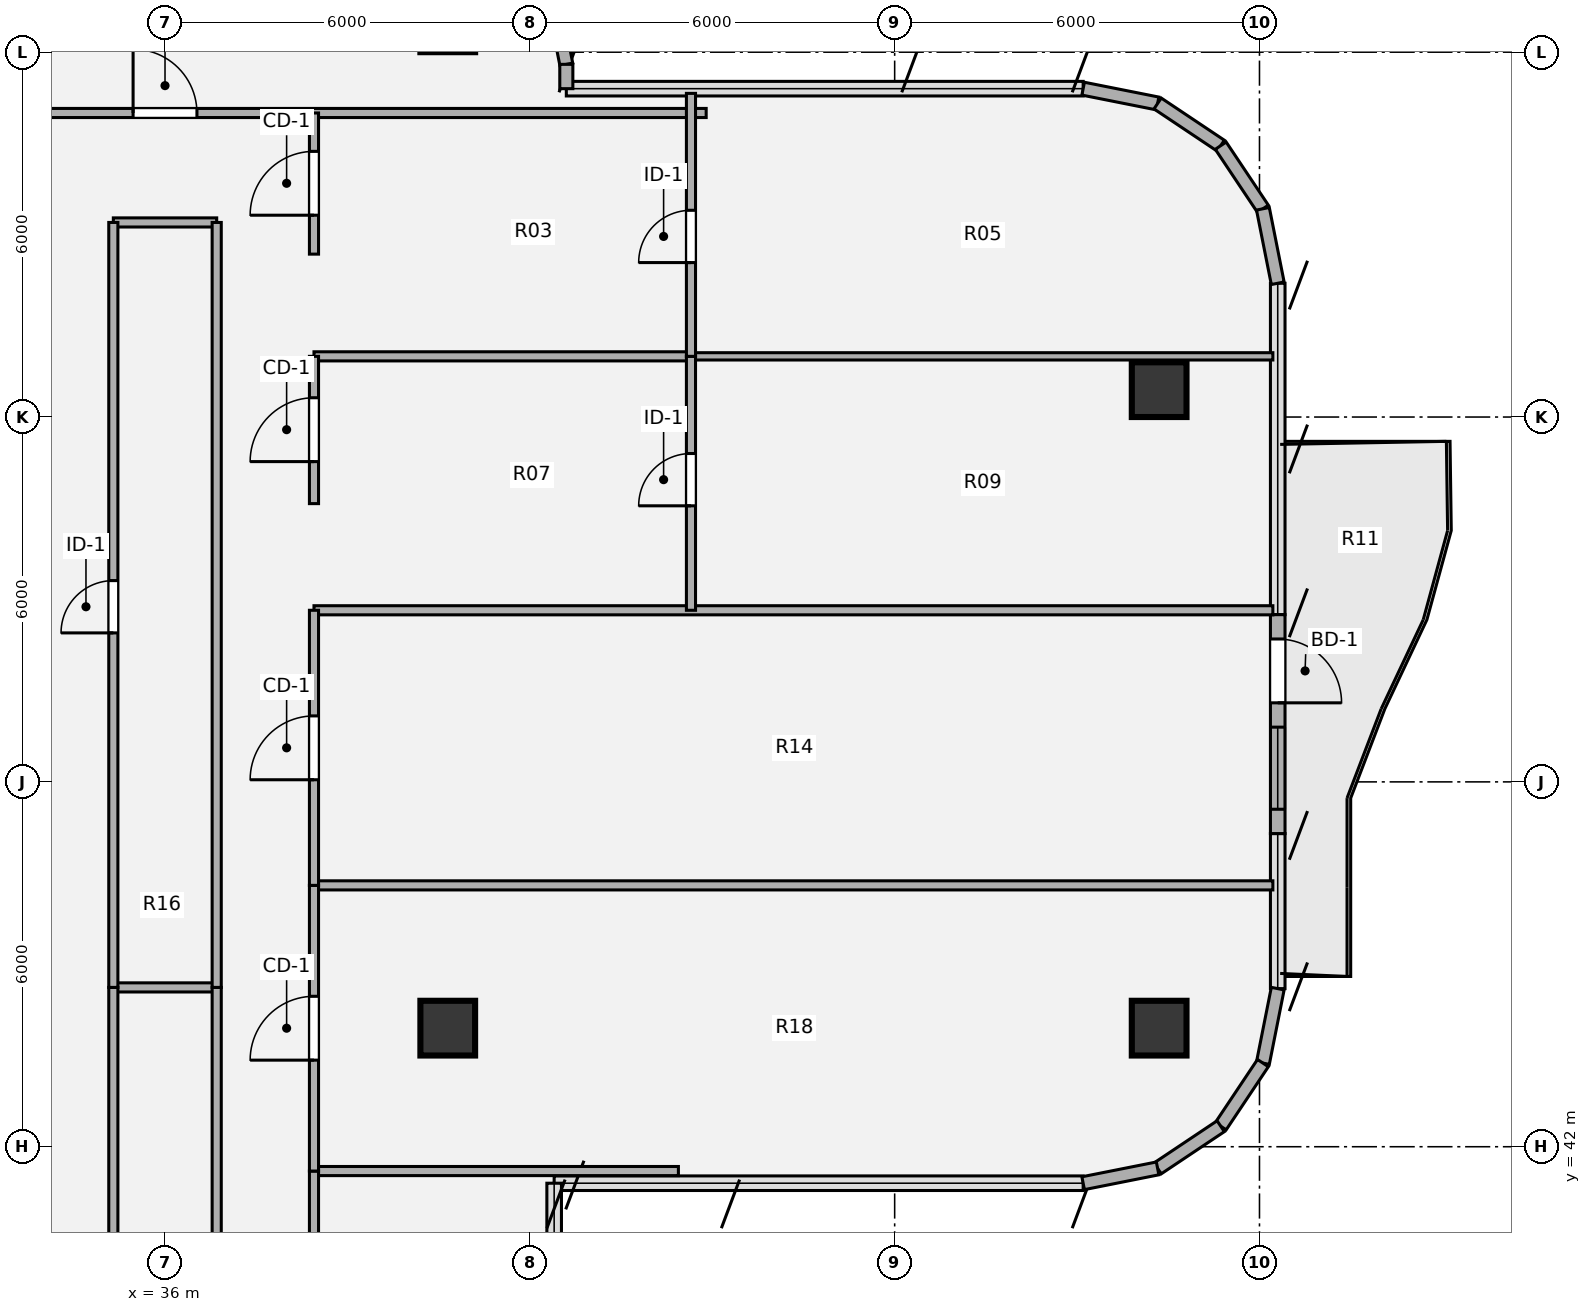
"""IFC4 building model, lengths in metres.
Left out: names, types, materials, properties, quantities, classifications, styles, units other than length and angle.
Written with IfcOpenShell. Run it as: python <this file> out.ifc"""

import sys

from ifc_helpers import new_model, si_unit, direction, frame, frame_2d, origin, origin_2d, place, context, subcontext, project, spatial, rectangle, hollow_circle, extrude, source, transform, mapped, element, fill, save


model = new_model("IFC4")
c1 = context("Model", 3, precision=1e-05, world=origin(), true_north=direction((0.0, 1.0)))
c2 = subcontext(c1, "Body", "Model", "MODEL_VIEW")
j1 = project(units=[si_unit("LENGTHUNIT", "METRE"), si_unit("PLANEANGLEUNIT", "RADIAN")], contexts=[c1])
p1 = place(None, origin())
s1 = spatial("IfcSite", under=j1, at=p1, CompositionType="ELEMENT")
p2 = place(p1, origin())
s2 = spatial("IfcBuilding", under=s1, at=p2, CompositionType="ELEMENT")
p3 = place(p2, frame((0.0, 0.0, 264.6)))
s3 = spatial("IfcBuildingStorey", under=s2, at=p3, CompositionType="ELEMENT", Elevation=264.6)
m1 = source(origin(), c2, "Body", "SweptSolid", [
    extrude(hollow_circle(Radius=0.45, WallThickness=0.032, at=origin_2d()), origin(), (0.0, 0.0, 1.0), 3.78),
])
for number, where, z_axis, x_axis in (
    (1, (52.35, 43.95, 0.0), (0.0, 0.0, 1.0), (1.0, 0.0, 0.0)),
    (2, (52.35, 54.45, 0.0), (0.0, 0.0, 1.0), (1.0, 0.0, 0.0)),
    (3, (40.65, 43.95, 0.0), (0.0, 0.0, 1.0), (1.0, 0.0, 0.0)),
):
    element("IfcColumn", number, at=place(p3, frame(where, z_axis=z_axis, x_axis=x_axis)), inside=s3, PredefinedType="COLUMN", context=c2, shape_type="MappedRepresentation", body=[
        mapped(m1, transform((0.0, 0.0, 0.0), x_axis=(1.0, 0.0, 0.0), y_axis=(0.0, 1.0, 0.0), z_axis=(0.0, 0.0, 1.0), scale=1.0)),
    ])
p4 = place(p3, frame((42.402, 60.795, 0.0), z_axis=(0.0, 0.0, 1.0), x_axis=(0.195190360752, -0.980765376158, 0.0)))
e4 = element("IfcWall", 4, at=p4, inside=s3, PredefinedType="SOLIDWALL", context=c2, shape_type="SweptSolid", body=[
    extrude(rectangle(XDim=1.014, YDim=0.215, at=frame_2d((0.507, 0.0))), origin(), (0.0, 0.0, 1.0), 3.53),
])
p5 = place(p3, frame((42.6, 59.8, 0.0), z_axis=(0.0, 0.0, 1.0), x_axis=(0.0, -1.0, 0.0)))
e5 = element("IfcWall", 5, at=p5, inside=s3, PredefinedType="SOLIDWALL", context=c2, shape_type="SweptSolid", body=[
    extrude(rectangle(XDim=0.4, YDim=0.215, at=frame_2d((0.2, 0.0))), origin(), (0.0, 0.0, 1.0), 3.53),
])
for number, where, z_axis, x_axis in (
    (6, (51.1, 59.4, 0.0), (0.0, 0.0, 1.0), (0.981, -0.195, 0.0)),
    (7, (52.325, 59.156, 0.0), (0.0, 0.0, 1.0), (0.831, -0.556, 0.0)),
    (8, (53.363, 58.463, 0.0), (0.0, 0.0, 1.0), (0.556, -0.831, 0.0)),
    (9, (54.056, 57.425, 0.0), (0.0, 0.0, 1.0), (0.195, -0.981, 0.0)),
):
    element("IfcWall", number, at=place(p3, frame(where, z_axis=z_axis, x_axis=x_axis)), inside=s3, PredefinedType="SOLIDWALL", context=c2, shape_type="SweptSolid", body=[
        extrude(rectangle(XDim=1.249, YDim=0.215, at=frame_2d((0.624, 0.0))), origin(), (0.0, 0.0, 1.0), 3.53),
    ])
p6 = place(p3, frame((54.3, 50.75, 0.0), z_axis=(0.0, 0.0, 1.0), x_axis=(0.0, -1.0, 0.0)))
e10 = element("IfcWall", 10, at=p6, inside=s3, PredefinedType="SOLIDWALL", context=c2, shape_type="SweptSolid", body=[
    extrude(rectangle(XDim=3.6, YDim=0.24, at=frame_2d((1.8, 0.0))), origin(), (0.0, 0.0, 1.0), 3.53),
])
p7 = place(p6, frame((0.4, 0.0, 0.0)))
e11 = element("IfcOpeningElement", 11, at=p7, cuts=e10, PredefinedType="OPENING", context=c2, shape_type="SweptSolid", body=[
    extrude(rectangle(XDim=1.05, YDim=2.15, at=origin_2d()), frame((0.525, 0.13, 1.075), z_axis=(0.0, -1.0, 0.0), x_axis=(1.0, 0.0, 0.0)), (0.0, 0.0, 1.0), 0.26),
])
p8 = place(p6, frame((1.85, 0.0, 0.85)))
e12 = element("IfcOpeningElement", 12, at=p8, cuts=e10, PredefinedType="OPENING", context=c2, shape_type="SweptSolid", body=[
    extrude(rectangle(XDim=1.35, YDim=1.35, at=origin_2d()), frame((0.675, 0.13, 0.675), z_axis=(0.0, -1.0, 0.0), x_axis=(1.0, 0.0, 0.0)), (0.0, 0.0, 1.0), 0.26),
])
for number, where, z_axis, x_axis in (
    (13, (54.3, 44.6, 0.0), (0.0, 0.0, 1.0), (-0.195, -0.981, 0.0)),
    (14, (54.056, 43.375, 0.0), (0.0, 0.0, 1.0), (-0.556, -0.831, 0.0)),
    (15, (53.363, 42.337, 0.0), (0.0, 0.0, 1.0), (-0.831, -0.556, 0.0)),
    (16, (52.325, 41.644, 0.0), (0.0, 0.0, 1.0), (-0.981, -0.195, 0.0)),
):
    element("IfcWall", number, at=place(p3, frame(where, z_axis=z_axis, x_axis=x_axis)), inside=s3, PredefinedType="SOLIDWALL", context=c2, shape_type="SweptSolid", body=[
        extrude(rectangle(XDim=1.249, YDim=0.215, at=frame_2d((0.624, 0.0))), origin(), (0.0, 0.0, 1.0), 3.53),
    ])
p9 = place(p3, frame((38.45, 41.6, 0.0), z_axis=(0.0, 0.0, 1.0), x_axis=(1.0, 0.0, 0.0)))
e17 = element("IfcWall", 17, at=p9, inside=s3, PredefinedType="PARTITIONING", context=c2, shape_type="SweptSolid", body=[
    extrude(rectangle(XDim=5.993, YDim=0.15, at=frame_2d((2.997, 0.0))), origin(), (0.0, 0.0, 1.0), 3.5),
])
p10 = place(p3, frame((35.15, 44.62, 0.0), z_axis=(0.0, 0.0, 1.0), x_axis=(1.0, 0.0, 0.0)))
e18 = element("IfcWall", 18, at=p10, inside=s3, PredefinedType="PARTITIONING", context=c2, shape_type="SweptSolid", body=[
    extrude(rectangle(XDim=1.7, YDim=0.15, at=frame_2d((0.85, 0.0))), origin(), (0.0, 0.0, 1.0), 3.259),
])
p11 = place(p3, frame((38.45, 46.298, 0.0), z_axis=(0.0, 0.0, 1.0), x_axis=(1.0, 0.0, 0.0)))
e19 = element("IfcWall", 19, at=p11, inside=s3, PredefinedType="PARTITIONING", context=c2, shape_type="SweptSolid", body=[
    extrude(rectangle(XDim=15.77, YDim=0.15, at=frame_2d((7.885, 0.0))), origin(), (0.0, 0.0, 1.0), 3.055),
])
p12 = place(p3, frame((38.45, 50.822, 0.0), z_axis=(0.0, 0.0, 1.0), x_axis=(1.0, 0.0, 0.0)))
e20 = element("IfcWall", 20, at=p12, inside=s3, PredefinedType="PARTITIONING", context=c2, shape_type="SweptSolid", body=[
    extrude(rectangle(XDim=15.77, YDim=0.15, at=frame_2d((7.885, 0.0))), origin(), (0.0, 0.0, 1.0), 2.982),
])
p13 = place(p3, frame((38.45, 54.998, 0.0), z_axis=(0.0, 0.0, 1.0), x_axis=(1.0, 0.0, 0.0)))
e21 = element("IfcWall", 21, at=p13, inside=s3, PredefinedType="PARTITIONING", context=c2, shape_type="SweptSolid", body=[
    extrude(rectangle(XDim=6.2, YDim=0.15, at=frame_2d((3.1, 0.0))), origin(), (0.0, 0.0, 1.0), 3.259),
])
p14 = place(p3, frame((44.65, 54.998, 0.0), z_axis=(0.0, 0.0, 1.0), x_axis=(1.0, 0.0, 0.0)))
e22 = element("IfcWall", 22, at=p14, inside=s3, PredefinedType="PARTITIONING", context=c2, shape_type="SweptSolid", body=[
    extrude(rectangle(XDim=9.57, YDim=0.12, at=frame_2d((4.785, 0.0))), origin(), (0.0, 0.0, 1.0), 3.5),
])
p15 = place(p3, frame((35.15, 57.2, 0.0), z_axis=(0.0, 0.0, 1.0), x_axis=(1.0, 0.0, 0.0)))
e23 = element("IfcWall", 23, at=p15, inside=s3, PredefinedType="PARTITIONING", context=c2, shape_type="SweptSolid", body=[
    extrude(rectangle(XDim=1.7, YDim=0.15, at=frame_2d((0.85, 0.0))), origin(), (0.0, 0.0, 1.0), 3.308),
])
p16 = place(p3, frame((27.1, 59.0, 0.0), z_axis=(0.0, 0.0, 1.0), x_axis=(1.0, 0.0, 0.0)))
e24 = element("IfcWall", 24, at=p16, inside=s3, PredefinedType="PARTITIONING", context=c2, shape_type="SweptSolid", body=[
    extrude(rectangle(XDim=17.8, YDim=0.15, at=frame_2d((8.9, 0.0))), origin(), (0.0, 0.0, 1.0), 3.308),
])
p17 = place(p16, frame((8.375, 0.0, 0.0)))
e25 = element("IfcOpeningElement", 25, at=p17, cuts=e24, PredefinedType="OPENING", context=c2, shape_type="SweptSolid", body=[
    extrude(rectangle(XDim=1.05, YDim=2.1, at=origin_2d()), frame((0.525, 0.085, 1.05), z_axis=(0.0, -1.0, 0.0), x_axis=(1.0, 0.0, 0.0)), (0.0, 0.0, 1.0), 0.17),
])
p18 = place(p3, frame((35.15, 25.2, 0.0), z_axis=(0.0, 0.0, 1.0), x_axis=(0.0, 1.0, 0.0)))
e26 = element("IfcWall", 26, at=p18, inside=s3, PredefinedType="PARTITIONING", context=c2, shape_type="SweptSolid", body=[
    extrude(rectangle(XDim=19.42, YDim=0.15, at=frame_2d((9.71, 0.0))), origin(), (0.0, 0.0, 1.0), 3.5),
])
p19 = place(p3, frame((35.15, 44.62, 0.0), z_axis=(0.0, 0.0, 1.0), x_axis=(0.0, 1.0, 0.0)))
e27 = element("IfcWall", 27, at=p19, inside=s3, PredefinedType="PARTITIONING", context=c2, shape_type="SweptSolid", body=[
    extrude(rectangle(XDim=12.58, YDim=0.15, at=frame_2d((6.29, 0.0))), origin(), (0.0, 0.0, 1.0), 3.5),
])
p20 = place(p19, frame((5.83, 0.0, 0.0)))
e28 = element("IfcOpeningElement", 28, at=p20, cuts=e27, PredefinedType="OPENING", context=c2, shape_type="SweptSolid", body=[
    extrude(rectangle(XDim=0.86, YDim=2.1, at=origin_2d()), frame((0.43, 0.085, 1.05), z_axis=(0.0, -1.0, 0.0), x_axis=(1.0, 0.0, 0.0)), (0.0, 0.0, 1.0), 0.17),
])
p21 = place(p3, frame((36.85, 25.2, 0.0), z_axis=(0.0, 0.0, 1.0), x_axis=(0.0, 1.0, 0.0)))
e29 = element("IfcWall", 29, at=p21, inside=s3, PredefinedType="PARTITIONING", context=c2, shape_type="SweptSolid", body=[
    extrude(rectangle(XDim=19.42, YDim=0.15, at=frame_2d((9.71, 0.0))), origin(), (0.0, 0.0, 1.0), 3.5),
])
p22 = place(p21, frame((9.185, 0.0, 0.0)))
e30 = element("IfcOpeningElement", 30, at=p22, cuts=e29, PredefinedType="OPENING", context=c2, shape_type="SweptSolid", body=[
    extrude(rectangle(XDim=1.05, YDim=2.1, at=origin_2d()), frame((0.525, 0.085, 1.05), z_axis=(0.0, -1.0, 0.0), x_axis=(1.0, 0.0, 0.0)), (0.0, 0.0, 1.0), 0.17),
])
p23 = place(p3, frame((36.85, 44.62, 0.0), z_axis=(0.0, 0.0, 1.0), x_axis=(0.0, 1.0, 0.0)))
e31 = element("IfcWall", 31, at=p23, inside=s3, PredefinedType="PARTITIONING", context=c2, shape_type="SweptSolid", body=[
    extrude(rectangle(XDim=12.58, YDim=0.15, at=frame_2d((6.29, 0.0))), origin(), (0.0, 0.0, 1.0), 3.5),
])
p24 = place(p3, frame((38.45, 22.4, 0.0), z_axis=(0.0, 0.0, 1.0), x_axis=(0.0, 1.0, 0.0)))
e32 = element("IfcWall", 32, at=p24, inside=s3, PredefinedType="PARTITIONING", context=c2, shape_type="SweptSolid", body=[
    extrude(rectangle(XDim=19.2, YDim=0.15, at=frame_2d((9.6, 0.0))), origin(), (0.0, 0.0, 1.0), 3.5),
])
p25 = place(p24, frame((8.975, 0.0, 0.0)))
e33 = element("IfcOpeningElement", 33, at=p25, cuts=e32, PredefinedType="OPENING", context=c2, shape_type="SweptSolid", body=[
    extrude(rectangle(XDim=1.05, YDim=2.1, at=origin_2d()), frame((0.525, 0.085, 1.05), z_axis=(0.0, -1.0, 0.0), x_axis=(1.0, 0.0, 0.0)), (0.0, 0.0, 1.0), 0.17),
])
p26 = place(p3, frame((38.45, 41.6, 0.0), z_axis=(0.0, 0.0, 1.0), x_axis=(0.0, 1.0, 0.0)))
e34 = element("IfcWall", 34, at=p26, inside=s3, PredefinedType="PARTITIONING", context=c2, shape_type="SweptSolid", body=[
    extrude(rectangle(XDim=4.698, YDim=0.15, at=frame_2d((2.349, 0.0))), origin(), (0.0, 0.0, 1.0), 3.5),
])
p27 = place(p26, frame((1.824, 0.0, 0.0)))
e35 = element("IfcOpeningElement", 35, at=p27, cuts=e34, PredefinedType="OPENING", context=c2, shape_type="SweptSolid", body=[
    extrude(rectangle(XDim=1.05, YDim=2.1, at=origin_2d()), frame((0.525, 0.085, 1.05), z_axis=(0.0, -1.0, 0.0), x_axis=(1.0, 0.0, 0.0)), (0.0, 0.0, 1.0), 0.17),
])
p28 = place(p3, frame((38.45, 46.298, 0.0), z_axis=(0.0, 0.0, 1.0), x_axis=(0.0, 1.0, 0.0)))
e36 = element("IfcWall", 36, at=p28, inside=s3, PredefinedType="PARTITIONING", context=c2, shape_type="SweptSolid", body=[
    extrude(rectangle(XDim=4.524, YDim=0.15, at=frame_2d((2.262, 0.0))), origin(), (0.0, 0.0, 1.0), 3.5),
])
p29 = place(p28, frame((1.737, 0.0, 0.0)))
e37 = element("IfcOpeningElement", 37, at=p29, cuts=e36, PredefinedType="OPENING", context=c2, shape_type="SweptSolid", body=[
    extrude(rectangle(XDim=1.05, YDim=2.1, at=origin_2d()), frame((0.525, 0.085, 1.05), z_axis=(0.0, -1.0, 0.0), x_axis=(1.0, 0.0, 0.0)), (0.0, 0.0, 1.0), 0.17),
])
p30 = place(p3, frame((38.45, 52.576, 0.0), z_axis=(0.0, 0.0, 1.0), x_axis=(0.0, 1.0, 0.0)))
e38 = element("IfcWall", 38, at=p30, inside=s3, PredefinedType="PARTITIONING", context=c2, shape_type="SweptSolid", body=[
    extrude(rectangle(XDim=2.422, YDim=0.15, at=frame_2d((1.211, 0.0))), origin(), (0.0, 0.0, 1.0), 3.5),
])
p31 = place(p30, frame((0.691, 0.0, 0.0)))
e39 = element("IfcOpeningElement", 39, at=p31, cuts=e38, PredefinedType="OPENING", context=c2, shape_type="SweptSolid", body=[
    extrude(rectangle(XDim=1.05, YDim=2.1, at=origin_2d()), frame((0.525, 0.085, 1.05), z_axis=(0.0, -1.0, 0.0), x_axis=(1.0, 0.0, 0.0)), (0.0, 0.0, 1.0), 0.17),
])
p32 = place(p3, frame((38.45, 56.679, 0.0), z_axis=(0.0, 0.0, 1.0), x_axis=(0.0, 1.0, 0.0)))
e40 = element("IfcWall", 40, at=p32, inside=s3, PredefinedType="PARTITIONING", context=c2, shape_type="SweptSolid", body=[
    extrude(rectangle(XDim=2.321, YDim=0.15, at=frame_2d((1.161, 0.0))), origin(), (0.0, 0.0, 1.0), 3.5),
])
p33 = place(p32, frame((0.64, 0.0, 0.0)))
e41 = element("IfcOpeningElement", 41, at=p33, cuts=e40, PredefinedType="OPENING", context=c2, shape_type="SweptSolid", body=[
    extrude(rectangle(XDim=1.05, YDim=2.1, at=origin_2d()), frame((0.525, 0.085, 1.05), z_axis=(0.0, -1.0, 0.0), x_axis=(1.0, 0.0, 0.0)), (0.0, 0.0, 1.0), 0.17),
])
p34 = place(p3, frame((44.65, 50.822, 0.0), z_axis=(0.0, 0.0, 1.0), x_axis=(0.0, 1.0, 0.0)))
e42 = element("IfcWall", 42, at=p34, inside=s3, PredefinedType="PARTITIONING", context=c2, shape_type="SweptSolid", body=[
    extrude(rectangle(XDim=4.176, YDim=0.15, at=frame_2d((2.088, 0.0))), origin(), (0.0, 0.0, 1.0), 3.5),
])
p35 = place(p34, frame((1.718, 0.0, 0.0)))
e43 = element("IfcOpeningElement", 43, at=p35, cuts=e42, PredefinedType="OPENING", context=c2, shape_type="SweptSolid", body=[
    extrude(rectangle(XDim=0.86, YDim=2.1, at=origin_2d()), frame((0.43, 0.085, 1.05), z_axis=(0.0, -1.0, 0.0), x_axis=(1.0, 0.0, 0.0)), (0.0, 0.0, 1.0), 0.17),
])
p36 = place(p3, frame((44.65, 54.998, 0.0), z_axis=(0.0, 0.0, 1.0), x_axis=(0.0, 1.0, 0.0)))
e44 = element("IfcWall", 44, at=p36, inside=s3, PredefinedType="PARTITIONING", context=c2, shape_type="SweptSolid", body=[
    extrude(rectangle(XDim=4.324, YDim=0.15, at=frame_2d((2.162, 0.0))), origin(), (0.0, 0.0, 1.0), 3.5),
])
p37 = place(p36, frame((1.542, 0.0, 0.0)))
e45 = element("IfcOpeningElement", 45, at=p37, cuts=e44, PredefinedType="OPENING", context=c2, shape_type="SweptSolid", body=[
    extrude(rectangle(XDim=0.86, YDim=2.1, at=origin_2d()), frame((0.43, 0.085, 1.05), z_axis=(0.0, -1.0, 0.0), x_axis=(1.0, 0.0, 0.0)), (0.0, 0.0, 1.0), 0.17),
])
m2 = source(origin(), c2, "Body", "SweptSolid", [
    extrude(rectangle(XDim=1.05, YDim=2.15, at=origin_2d()), frame((0.525, 0.025, 1.075), z_axis=(0.0, -1.0, 0.0), x_axis=(1.0, 0.0, 0.0)), (0.0, 0.0, 1.0), 0.05),
])
p38 = place(p7, origin())
e46 = element("IfcDoor", 46, at=p38, inside=s3, OperationType="SINGLE_SWING_RIGHT", PredefinedType="DOOR", context=c2, shape_type="MappedRepresentation", body=[
    mapped(m2, transform((0.0, 0.0, 0.0), x_axis=(1.0, 0.0, 0.0), y_axis=(0.0, 1.0, 0.0), z_axis=(0.0, 0.0, 1.0), scale=1.0)),
])
fill(e11, e46)
m3 = source(origin(), c2, "Body", "SweptSolid", [
    extrude(rectangle(XDim=1.35, YDim=1.35, at=origin_2d()), frame((0.675, 0.03, 0.675), z_axis=(0.0, -1.0, 0.0), x_axis=(1.0, 0.0, 0.0)), (0.0, 0.0, 1.0), 0.06),
])
p39 = place(p8, origin())
e47 = element("IfcWindow", 47, at=p39, inside=s3, PartitioningType="SINGLE_PANEL", PredefinedType="WINDOW", context=c2, shape_type="MappedRepresentation", body=[
    mapped(m3, transform((0.0, 0.0, 0.0), x_axis=(1.0, 0.0, 0.0), y_axis=(0.0, 1.0, 0.0), z_axis=(0.0, 0.0, 1.0), scale=1.0)),
])
fill(e12, e47)
m4 = source(origin(), c2, "Body", "SweptSolid", [
    extrude(rectangle(XDim=1.05, YDim=2.1, at=origin_2d()), frame((0.525, 0.025, 1.05), z_axis=(0.0, -1.0, 0.0), x_axis=(1.0, 0.0, 0.0)), (0.0, 0.0, 1.0), 0.05),
])
p40 = place(p17, origin())
e48 = element("IfcDoor", 48, at=p40, inside=s3, OperationType="SINGLE_SWING_LEFT", PredefinedType="DOOR", context=c2, shape_type="MappedRepresentation", body=[
    mapped(m4, transform((0.0, 0.0, 0.0), x_axis=(1.0, 0.0, 0.0), y_axis=(0.0, 1.0, 0.0), z_axis=(0.0, 0.0, 1.0), scale=1.0)),
])
fill(e25, e48)
m5 = source(origin(), c2, "Body", "SweptSolid", [
    extrude(rectangle(XDim=0.86, YDim=2.1, at=origin_2d()), frame((0.43, 0.025, 1.05), z_axis=(0.0, -1.0, 0.0), x_axis=(1.0, 0.0, 0.0)), (0.0, 0.0, 1.0), 0.05),
])
p41 = place(p20, origin())
e49 = element("IfcDoor", 49, at=p41, inside=s3, OperationType="SINGLE_SWING_LEFT", PredefinedType="DOOR", context=c2, shape_type="MappedRepresentation", body=[
    mapped(m5, transform((0.0, 0.0, 0.0), x_axis=(1.0, 0.0, 0.0), y_axis=(0.0, 1.0, 0.0), z_axis=(0.0, 0.0, 1.0), scale=1.0)),
])
fill(e28, e49)
m6 = source(origin(), c2, "Body", "SweptSolid", [
    extrude(rectangle(XDim=1.05, YDim=2.1, at=origin_2d()), frame((0.525, 0.025, 1.05), z_axis=(0.0, -1.0, 0.0), x_axis=(1.0, 0.0, 0.0)), (0.0, 0.0, 1.0), 0.05),
])
p42 = place(p27, origin())
e50 = element("IfcDoor", 50, at=p42, inside=s3, OperationType="SINGLE_SWING_LEFT", PredefinedType="DOOR", context=c2, shape_type="MappedRepresentation", body=[
    mapped(m6, transform((0.0, 0.0, 0.0), x_axis=(1.0, 0.0, 0.0), y_axis=(0.0, 1.0, 0.0), z_axis=(0.0, 0.0, 1.0), scale=1.0)),
])
fill(e35, e50)
p43 = place(p29, origin())
e51 = element("IfcDoor", 51, at=p43, inside=s3, OperationType="SINGLE_SWING_LEFT", PredefinedType="DOOR", context=c2, shape_type="MappedRepresentation", body=[
    mapped(m6, transform((0.0, 0.0, 0.0), x_axis=(1.0, 0.0, 0.0), y_axis=(0.0, 1.0, 0.0), z_axis=(0.0, 0.0, 1.0), scale=1.0)),
])
fill(e37, e51)
p44 = place(p31, origin())
e52 = element("IfcDoor", 52, at=p44, inside=s3, OperationType="SINGLE_SWING_LEFT", PredefinedType="DOOR", context=c2, shape_type="MappedRepresentation", body=[
    mapped(m6, transform((0.0, 0.0, 0.0), x_axis=(1.0, 0.0, 0.0), y_axis=(0.0, 1.0, 0.0), z_axis=(0.0, 0.0, 1.0), scale=1.0)),
])
fill(e39, e52)
p45 = place(p33, origin())
e53 = element("IfcDoor", 53, at=p45, inside=s3, OperationType="SINGLE_SWING_LEFT", PredefinedType="DOOR", context=c2, shape_type="MappedRepresentation", body=[
    mapped(m6, transform((0.0, 0.0, 0.0), x_axis=(1.0, 0.0, 0.0), y_axis=(0.0, 1.0, 0.0), z_axis=(0.0, 0.0, 1.0), scale=1.0)),
])
fill(e41, e53)
p46 = place(p35, origin())
e54 = element("IfcDoor", 54, at=p46, inside=s3, OperationType="SINGLE_SWING_LEFT", PredefinedType="DOOR", context=c2, shape_type="MappedRepresentation", body=[
    mapped(m5, transform((0.0, 0.0, 0.0), x_axis=(1.0, 0.0, 0.0), y_axis=(0.0, 1.0, 0.0), z_axis=(0.0, 0.0, 1.0), scale=1.0)),
])
fill(e43, e54)
p47 = place(p37, origin())
e55 = element("IfcDoor", 55, at=p47, inside=s3, OperationType="SINGLE_SWING_LEFT", PredefinedType="DOOR", context=c2, shape_type="MappedRepresentation", body=[
    mapped(m5, transform((0.0, 0.0, 0.0), x_axis=(1.0, 0.0, 0.0), y_axis=(0.0, 1.0, 0.0), z_axis=(0.0, 0.0, 1.0), scale=1.0)),
])
fill(e45, e55)
save(model, sys.argv[1])
